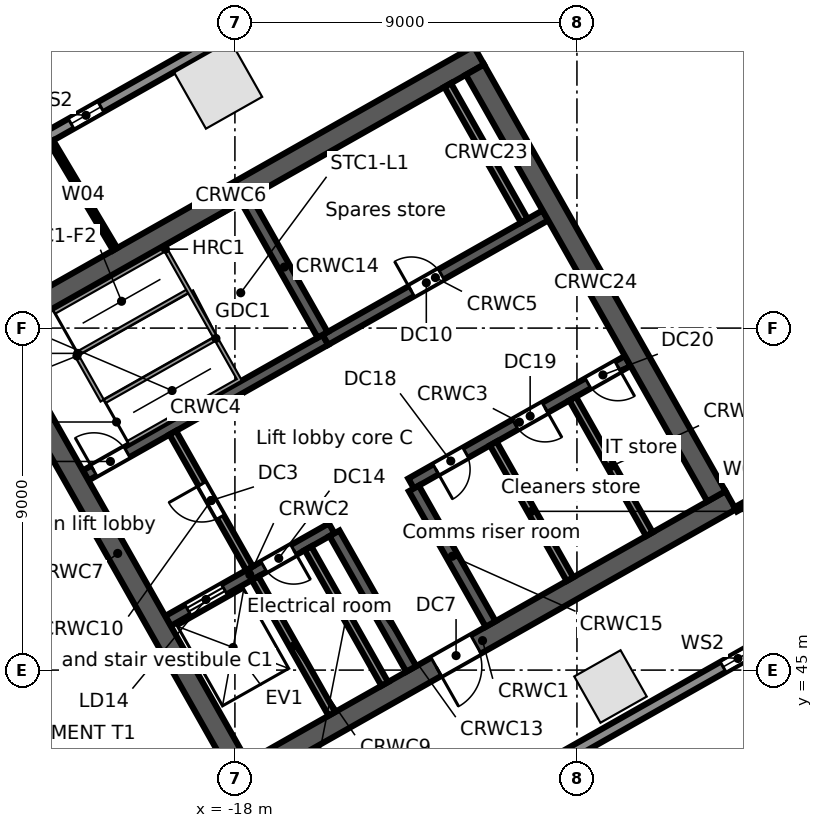
"""IFC4 building model, lengths in metres.
Left out: names, types, materials, properties, quantities, classifications, styles, units other than length and angle.
Written with IfcOpenShell. Run it as: python <this file> out.ifc"""

import sys

from ifc_helpers import new_model, si_unit, direction, frame, frame_2d, origin, origin_2d, place, context, subcontext, project, spatial, rectangle, extrude, element, fill, save


model = new_model("IFC4")
c1 = context("Model", 3, precision=1e-05, world=origin(), true_north=direction((0.0, 1.0)))
c2 = subcontext(c1, "Body", "Model", "MODEL_VIEW")
j1 = project(units=[si_unit("LENGTHUNIT", "METRE"), si_unit("PLANEANGLEUNIT", "RADIAN")], contexts=[c1])
p1 = place(None, origin())
s1 = spatial("IfcSite", under=j1, at=p1, CompositionType="ELEMENT")
p2 = place(p1, origin())
s2 = spatial("IfcBuilding", under=s1, at=p2, CompositionType="ELEMENT")
p3 = place(p2, frame((0.0, 0.0, 136.7)))
s3 = spatial("IfcBuildingStorey", under=s2, at=p3, CompositionType="ELEMENT", Elevation=136.7)
p4 = place(p3, frame((-18.441, 60.406, 0.0), z_axis=(0.0, 0.0, 1.0), x_axis=(-0.87035569594, -0.492423560103, 0.0)))
e1 = element("IfcColumn", 1, at=p4, inside=s3, PredefinedType="COLUMN", context=c2, shape_type="SweptSolid", body=[
    extrude(rectangle(XDim=1.7, YDim=1.7, at=origin_2d()), origin(), (0.0, 0.0, 1.0), 4.4),
])
p5 = place(p3, frame((-8.117, 44.568, 0.0), z_axis=(0.0, 0.0, 1.0), x_axis=(0.87035569594, 0.492423560103, 0.0)))
e2 = element("IfcColumn", 2, at=p5, inside=s3, PredefinedType="COLUMN", context=c2, shape_type="SweptSolid", body=[
    extrude(rectangle(XDim=1.4, YDim=1.4, at=origin_2d()), origin(), (0.0, 0.0, 1.0), 4.4),
])
p6 = place(p3, frame((-58.745, 38.764, 0.0), z_axis=(0.0, 0.0, 1.0), x_axis=(0.870355811726, 0.492423355453, 0.0)))
e3 = element("IfcWall", 3, at=p6, inside=s3, PredefinedType="STANDARD", context=c2, shape_type="SweptSolid", body=[
    extrude(rectangle(XDim=64.025, YDim=0.3, at=frame_2d((32.013, 0.0))), origin(), (0.0, 0.0, 1.0), 4.08),
])
p7 = place(p6, frame((60.122, 0.0, 0.6)))
e4 = element("IfcOpeningElement", 4, at=p7, cuts=e3, PredefinedType="OPENING", context=c2, shape_type="SweptSolid", body=[
    extrude(rectangle(XDim=0.9, YDim=2.8, at=frame_2d((0.45, 1.4))), frame((0.0, 0.16, 0.0), z_axis=(0.0, -1.0, 0.0), x_axis=(1.0, 0.0, 0.0)), (0.0, 0.0, 1.0), 0.32),
])
p8 = place(p6, frame((50.992, 0.0, 0.6)))
e5 = element("IfcOpeningElement", 5, at=p8, cuts=e3, PredefinedType="OPENING", context=c2, shape_type="SweptSolid", body=[
    extrude(rectangle(XDim=0.9, YDim=2.8, at=frame_2d((0.45, 1.4))), frame((0.0, 0.16, 0.0), z_axis=(0.0, -1.0, 0.0), x_axis=(1.0, 0.0, 0.0)), (0.0, 0.0, 1.0), 0.32),
])
p9 = place(p6, frame((41.862, 0.0, 0.6)))
e6 = element("IfcOpeningElement", 6, at=p9, cuts=e3, PredefinedType="OPENING", context=c2, shape_type="SweptSolid", body=[
    extrude(rectangle(XDim=0.9, YDim=2.8, at=frame_2d((0.45, 1.4))), frame((0.0, 0.16, 0.0), z_axis=(0.0, -1.0, 0.0), x_axis=(1.0, 0.0, 0.0)), (0.0, 0.0, 1.0), 0.32),
])
p10 = place(p6, frame((32.732, 0.0, 0.6)))
e7 = element("IfcOpeningElement", 7, at=p10, cuts=e3, PredefinedType="OPENING", context=c2, shape_type="SweptSolid", body=[
    extrude(rectangle(XDim=0.9, YDim=2.8, at=frame_2d((0.45, 1.4))), frame((0.0, 0.16, 0.0), z_axis=(0.0, -1.0, 0.0), x_axis=(1.0, 0.0, 0.0)), (0.0, 0.0, 1.0), 0.32),
])
p11 = place(p6, frame((23.602, 0.0, 0.6)))
e8 = element("IfcOpeningElement", 8, at=p11, cuts=e3, PredefinedType="OPENING", context=c2, shape_type="SweptSolid", body=[
    extrude(rectangle(XDim=0.9, YDim=2.8, at=frame_2d((0.45, 1.4))), frame((0.0, 0.16, 0.0), z_axis=(0.0, -1.0, 0.0), x_axis=(1.0, 0.0, 0.0)), (0.0, 0.0, 1.0), 0.32),
])
p12 = place(p6, frame((14.472, 0.0, 0.6)))
e9 = element("IfcOpeningElement", 9, at=p12, cuts=e3, PredefinedType="OPENING", context=c2, shape_type="SweptSolid", body=[
    extrude(rectangle(XDim=0.9, YDim=2.8, at=frame_2d((0.45, 1.4))), frame((0.0, 0.16, 0.0), z_axis=(0.0, -1.0, 0.0), x_axis=(1.0, 0.0, 0.0)), (0.0, 0.0, 1.0), 0.32),
])
p13 = place(p6, frame((5.342, 0.0, 0.6)))
e10 = element("IfcOpeningElement", 10, at=p13, cuts=e3, PredefinedType="OPENING", context=c2, shape_type="SweptSolid", body=[
    extrude(rectangle(XDim=0.9, YDim=2.8, at=frame_2d((0.45, 1.4))), frame((0.0, 0.16, 0.0), z_axis=(0.0, -1.0, 0.0), x_axis=(1.0, 0.0, 0.0)), (0.0, 0.0, 1.0), 0.32),
])
p14 = place(p3, frame((-0.055, 47.969, 0.0), z_axis=(0.0, 0.0, 1.0), x_axis=(-0.870355730478, -0.492423499058, 0.0)))
e11 = element("IfcWall", 11, at=p14, inside=s3, PredefinedType="STANDARD", context=c2, shape_type="SweptSolid", body=[
    extrude(rectangle(XDim=43.75, YDim=0.3, at=frame_2d((21.875, 0.0))), origin(), (0.0, 0.0, 1.0), 4.08),
])
p15 = place(p14, frame((39.977, 0.0, 0.6)))
e12 = element("IfcOpeningElement", 12, at=p15, cuts=e11, PredefinedType="OPENING", context=c2, shape_type="SweptSolid", body=[
    extrude(rectangle(XDim=0.9, YDim=2.8, at=frame_2d((0.45, 1.4))), frame((0.0, 0.16, 0.0), z_axis=(0.0, -1.0, 0.0), x_axis=(1.0, 0.0, 0.0)), (0.0, 0.0, 1.0), 0.32),
])
p16 = place(p14, frame((31.222, 0.0, 0.6)))
e13 = element("IfcOpeningElement", 13, at=p16, cuts=e11, PredefinedType="OPENING", context=c2, shape_type="SweptSolid", body=[
    extrude(rectangle(XDim=0.9, YDim=2.8, at=frame_2d((0.45, 1.4))), frame((0.0, 0.16, 0.0), z_axis=(0.0, -1.0, 0.0), x_axis=(1.0, 0.0, 0.0)), (0.0, 0.0, 1.0), 0.32),
])
p17 = place(p14, frame((22.468, 0.0, 0.6)))
e14 = element("IfcOpeningElement", 14, at=p17, cuts=e11, PredefinedType="OPENING", context=c2, shape_type="SweptSolid", body=[
    extrude(rectangle(XDim=0.9, YDim=2.8, at=frame_2d((0.45, 1.4))), frame((0.0, 0.16, 0.0), z_axis=(0.0, -1.0, 0.0), x_axis=(1.0, 0.0, 0.0)), (0.0, 0.0, 1.0), 0.32),
])
p18 = place(p14, frame((13.713, 0.0, 0.6)))
e15 = element("IfcOpeningElement", 15, at=p18, cuts=e11, PredefinedType="OPENING", context=c2, shape_type="SweptSolid", body=[
    extrude(rectangle(XDim=0.9, YDim=2.8, at=frame_2d((0.45, 1.4))), frame((0.0, 0.16, 0.0), z_axis=(0.0, -1.0, 0.0), x_axis=(1.0, 0.0, 0.0)), (0.0, 0.0, 1.0), 0.32),
])
p19 = place(p14, frame((4.959, 0.0, 0.6)))
e16 = element("IfcOpeningElement", 16, at=p19, cuts=e11, PredefinedType="OPENING", context=c2, shape_type="SweptSolid", body=[
    extrude(rectangle(XDim=0.9, YDim=2.8, at=frame_2d((0.45, 1.4))), frame((0.0, 0.16, 0.0), z_axis=(0.0, -1.0, 0.0), x_axis=(1.0, 0.0, 0.0)), (0.0, 0.0, 1.0), 0.32),
])
p20 = place(p3, frame((-18.012, 42.083, 0.0), z_axis=(0.0, 0.0, 1.0), x_axis=(0.870360574057, 0.492414937962, 0.0)))
e17 = element("IfcWall", 17, at=p20, inside=s3, PredefinedType="SOLIDWALL", context=c2, shape_type="SweptSolid", body=[
    extrude(rectangle(XDim=15.0, YDim=0.55, at=frame_2d((7.5, 0.0))), origin(), (0.0, 0.0, 1.0), 4.08),
])
p21 = place(p20, frame((6.1, 0.0, 0.0)))
e18 = element("IfcOpeningElement", 18, at=p21, cuts=e17, PredefinedType="OPENING", context=c2, shape_type="SweptSolid", body=[
    extrude(rectangle(XDim=1.2, YDim=2.1, at=frame_2d((0.6, 1.05))), frame((0.0, 0.285, 0.0), z_axis=(0.0, -1.0, 0.0), x_axis=(1.0, 0.0, 0.0)), (0.0, 0.0, 1.0), 0.57),
])
p22 = place(p3, frame((-19.762, 46.292, 0.0), z_axis=(0.0, 0.0, 1.0), x_axis=(0.870359758983, 0.49241637863, 0.0)))
e19 = element("IfcWall", 19, at=p22, inside=s3, PredefinedType="SOLIDWALL", context=c2, shape_type="SweptSolid", body=[
    extrude(rectangle(XDim=4.95, YDim=0.3, at=frame_2d((2.475, 0.0))), origin(), (0.0, 0.0, 1.0), 4.08),
])
p23 = place(p22, frame((0.6, 0.0, 0.0)))
e20 = element("IfcOpeningElement", 20, at=p23, cuts=e19, PredefinedType="OPENING", context=c2, shape_type="SweptSolid", body=[
    extrude(rectangle(XDim=1.1, YDim=2.1, at=frame_2d((0.55, 1.05))), frame((0.0, 0.16, 0.0), z_axis=(0.0, -1.0, 0.0), x_axis=(1.0, 0.0, 0.0)), (0.0, 0.0, 1.0), 0.32),
])
p24 = place(p22, frame((2.9, 0.0, 0.0)))
e21 = element("IfcOpeningElement", 21, at=p24, cuts=e19, PredefinedType="OPENING", context=c2, shape_type="SweptSolid", body=[
    extrude(rectangle(XDim=0.9, YDim=2.1, at=frame_2d((0.45, 1.05))), frame((0.0, 0.16, 0.0), z_axis=(0.0, -1.0, 0.0), x_axis=(1.0, 0.0, 0.0)), (0.0, 0.0, 1.0), 0.32),
])
p25 = place(p3, frame((-13.365, 49.911, 0.0), z_axis=(0.0, 0.0, 1.0), x_axis=(0.870336435567, 0.492457601144, 0.0)))
e22 = element("IfcWall", 22, at=p25, inside=s3, PredefinedType="SOLIDWALL", context=c2, shape_type="SweptSolid", body=[
    extrude(rectangle(XDim=6.55, YDim=0.3, at=frame_2d((3.275, 0.0))), origin(), (0.0, 0.0, 1.0), 4.08),
])
p26 = place(p25, frame((0.75, 0.0, 0.0)))
e23 = element("IfcOpeningElement", 23, at=p26, cuts=e22, PredefinedType="OPENING", context=c2, shape_type="SweptSolid", body=[
    extrude(rectangle(XDim=0.9, YDim=2.1, at=frame_2d((0.45, 1.05))), frame((0.0, 0.16, 0.0), z_axis=(0.0, -1.0, 0.0), x_axis=(1.0, 0.0, 0.0)), (0.0, 0.0, 1.0), 0.32),
])
p27 = place(p25, frame((3.15, 0.0, 0.0)))
e24 = element("IfcOpeningElement", 24, at=p27, cuts=e22, PredefinedType="OPENING", context=c2, shape_type="SweptSolid", body=[
    extrude(rectangle(XDim=0.9, YDim=2.1, at=frame_2d((0.45, 1.05))), frame((0.0, 0.16, 0.0), z_axis=(0.0, -1.0, 0.0), x_axis=(1.0, 0.0, 0.0)), (0.0, 0.0, 1.0), 0.32),
])
p28 = place(p25, frame((5.35, 0.0, 0.0)))
e25 = element("IfcOpeningElement", 25, at=p28, cuts=e22, PredefinedType="OPENING", context=c2, shape_type="SweptSolid", body=[
    extrude(rectangle(XDim=0.9, YDim=2.1, at=frame_2d((0.45, 1.05))), frame((0.0, 0.16, 0.0), z_axis=(0.0, -1.0, 0.0), x_axis=(1.0, 0.0, 0.0)), (0.0, 0.0, 1.0), 0.32),
])
p29 = place(p3, frame((-21.928, 50.121, 0.0), z_axis=(0.0, 0.0, 1.0), x_axis=(0.870340732628, 0.49245000673, 0.0)))
e26 = element("IfcWall", 26, at=p29, inside=s3, PredefinedType="SOLIDWALL", context=c2, shape_type="SweptSolid", body=[
    extrude(rectangle(XDim=7.25, YDim=0.3, at=frame_2d((3.625, 0.0))), origin(), (0.0, 0.0, 1.0), 4.08),
])
p30 = place(p29, frame((0.25, 0.0, 0.0)))
e27 = element("IfcOpeningElement", 27, at=p30, cuts=e26, PredefinedType="OPENING", context=c2, shape_type="SweptSolid", body=[
    extrude(rectangle(XDim=1.0, YDim=2.1, at=frame_2d((0.5, 1.05))), frame((0.0, 0.16, 0.0), z_axis=(0.0, -1.0, 0.0), x_axis=(1.0, 0.0, 0.0)), (0.0, 0.0, 1.0), 0.32),
])
p31 = place(p3, frame((-15.618, 53.691, 0.0), z_axis=(0.0, 0.0, 1.0), x_axis=(0.870367894134, 0.492401999246, 0.0)))
e28 = element("IfcWall", 28, at=p31, inside=s3, PredefinedType="SOLIDWALL", context=c2, shape_type="SweptSolid", body=[
    extrude(rectangle(XDim=6.65, YDim=0.3, at=frame_2d((3.325, 0.0))), origin(), (0.0, 0.0, 1.0), 4.08),
])
p32 = place(p31, frame((2.6, 0.0, 0.0)))
e29 = element("IfcOpeningElement", 29, at=p32, cuts=e28, PredefinedType="OPENING", context=c2, shape_type="SweptSolid", body=[
    extrude(rectangle(XDim=0.9, YDim=2.1, at=frame_2d((0.45, 1.05))), frame((0.0, 0.16, 0.0), z_axis=(0.0, -1.0, 0.0), x_axis=(1.0, 0.0, 0.0)), (0.0, 0.0, 1.0), 0.32),
])
p33 = place(p3, frame((-24.635, 53.789, 0.0), z_axis=(0.0, 0.0, 1.0), x_axis=(0.870360574057, 0.492414937962, 0.0)))
e30 = element("IfcWall", 30, at=p33, inside=s3, PredefinedType="SOLIDWALL", context=c2, shape_type="SweptSolid", body=[
    extrude(rectangle(XDim=15.0, YDim=0.55, at=frame_2d((7.5, 0.0))), origin(), (0.0, 0.0, 1.0), 4.08),
])
p34 = place(p3, frame((-24.26, 53.685, 0.0), z_axis=(0.0, 0.0, 1.0), x_axis=(0.492427022044, -0.870353737259, 0.0)))
e31 = element("IfcWall", 31, at=p34, inside=s3, PredefinedType="SOLIDWALL", context=c2, shape_type="SweptSolid", body=[
    extrude(rectangle(XDim=12.9, YDim=0.55, at=frame_2d((6.45, 0.0))), origin(), (0.0, 0.0, 1.0), 4.08),
])
p35 = place(p3, frame((-17.469, 47.417, 0.0), z_axis=(0.0, 0.0, 1.0), x_axis=(0.492453559952, -0.87033872216, 0.0)))
e32 = element("IfcWall", 32, at=p35, inside=s3, PredefinedType="SOLIDWALL", context=c2, shape_type="SweptSolid", body=[
    extrude(rectangle(XDim=4.1, YDim=0.2, at=frame_2d((2.05, 0.0))), origin(), (0.0, 0.0, 1.0), 4.08),
])
p36 = place(p3, frame((-19.635, 51.246, 0.0), z_axis=(0.0, 0.0, 1.0), x_axis=(0.492408451753, -0.87036424366, 0.0)))
e33 = element("IfcWall", 33, at=p36, inside=s3, PredefinedType="PARTITIONING", context=c2, shape_type="SweptSolid", body=[
    extrude(rectangle(XDim=4.1, YDim=0.2, at=frame_2d((2.05, 0.0))), origin(), (0.0, 0.0, 1.0), 4.08),
])
p37 = place(p36, frame((1.55, 0.0, 0.0)))
e34 = element("IfcOpeningElement", 34, at=p37, cuts=e33, PredefinedType="OPENING", context=c2, shape_type="SweptSolid", body=[
    extrude(rectangle(XDim=1.0, YDim=2.1, at=frame_2d((0.5, 1.05))), frame((0.0, 0.11, 0.0), z_axis=(0.0, -1.0, 0.0), x_axis=(1.0, 0.0, 0.0)), (0.0, 0.0, 1.0), 0.22),
])
p38 = place(p3, frame((-16.076, 48.205, 0.0), z_axis=(0.0, 0.0, 1.0), x_axis=(0.492408451753, -0.87036424366, 0.0)))
e35 = element("IfcWall", 35, at=p38, inside=s3, PredefinedType="SOLIDWALL", context=c2, shape_type="SweptSolid", body=[
    extrude(rectangle(XDim=4.1, YDim=0.2, at=frame_2d((2.05, 0.0))), origin(), (0.0, 0.0, 1.0), 4.08),
])
for number, where, z_axis, x_axis in (
    (36, (-15.379, 48.599, 0.0), (0.0, 0.0, 1.0), (0.492, -0.87, 0.0)),
    (37, (-17.711, 57.39, 0.0), (0.0, 0.0, 1.0), (0.492, -0.87, 0.0)),
):
    element("IfcWall", number, at=place(p3, frame(where, z_axis=z_axis, x_axis=x_axis)), inside=s3, PredefinedType="SOLIDWALL", context=c2, shape_type="SweptSolid", body=[
        extrude(rectangle(XDim=4.1, YDim=0.3, at=frame_2d((2.05, 0.0))), origin(), (0.0, 0.0, 1.0), 4.08),
    ])
p39 = place(p3, frame((-13.291, 49.781, 0.0), z_axis=(0.0, 0.0, 1.0), x_axis=(0.492382931784, -0.870378681085, 0.0)))
e38 = element("IfcWall", 38, at=p39, inside=s3, PredefinedType="SOLIDWALL", context=c2, shape_type="SweptSolid", body=[
    extrude(rectangle(XDim=4.1, YDim=0.3, at=frame_2d((2.05, 0.0))), origin(), (0.0, 0.0, 1.0), 4.08),
])
p40 = place(p3, frame((-11.202, 50.962, 0.0), z_axis=(0.0, 0.0, 1.0), x_axis=(0.492428039142, -0.870353161807, 0.0)))
e39 = element("IfcWall", 39, at=p40, inside=s3, PredefinedType="PARTITIONING", context=c2, shape_type="SweptSolid", body=[
    extrude(rectangle(XDim=4.1, YDim=0.2, at=frame_2d((2.05, 0.0))), origin(), (0.0, 0.0, 1.0), 4.08),
])
p41 = place(p3, frame((-9.113, 52.144, 0.0), z_axis=(0.0, 0.0, 1.0), x_axis=(0.492408451753, -0.87036424366, 0.0)))
e40 = element("IfcWall", 40, at=p41, inside=s3, PredefinedType="PARTITIONING", context=c2, shape_type="SweptSolid", body=[
    extrude(rectangle(XDim=4.1, YDim=0.2, at=frame_2d((2.05, 0.0))), origin(), (0.0, 0.0, 1.0), 4.08),
])
p42 = place(p3, frame((-12.402, 60.394, 0.0), z_axis=(0.0, 0.0, 1.0), x_axis=(0.492453559952, -0.87033872216, 0.0)))
e41 = element("IfcWall", 41, at=p42, inside=s3, PredefinedType="SOLIDWALL", context=c2, shape_type="SweptSolid", body=[
    extrude(rectangle(XDim=4.1, YDim=0.2, at=frame_2d((2.05, 0.0))), origin(), (0.0, 0.0, 1.0), 4.08),
])
p43 = place(p3, frame((-11.684, 60.8, 0.0), z_axis=(0.0, 0.0, 1.0), x_axis=(0.492427022044, -0.870353737259, 0.0)))
e42 = element("IfcWall", 42, at=p43, inside=s3, PredefinedType="SOLIDWALL", context=c2, shape_type="SweptSolid", body=[
    extrude(rectangle(XDim=12.9, YDim=0.55, at=frame_2d((6.45, 0.0))), origin(), (0.0, 0.0, 1.0), 4.08),
])
p44 = place(p3, frame((-22.835, 58.908, 0.0), z_axis=(0.0, 0.0, 1.0), x_axis=(0.511113859879, -0.859513014584, 0.0)))
e43 = element("IfcWall", 43, at=p44, inside=s3, PredefinedType="PARTITIONING", context=c2, shape_type="SweptSolid", body=[
    extrude(rectangle(XDim=3.295, YDim=0.125, at=frame_2d((1.647, 0.0))), origin(), (0.0, 0.0, 1.0), 3.36),
])
p45 = place(p3, frame((-4.821, 49.23, 0.0), z_axis=(0.0, 0.0, 1.0), x_axis=(0.870371217631, 0.492396124598, 0.0)))
e44 = element("IfcWall", 44, at=p45, inside=s3, PredefinedType="PARTITIONING", context=c2, shape_type="SweptSolid", body=[
    extrude(rectangle(XDim=2.659, YDim=0.125, at=frame_2d((1.329, 0.0))), origin(), (0.0, 0.0, 1.0), 4.08),
])
p46 = place(p9, origin())
e45 = element("IfcWindow", 45, at=p46, inside=s3, PartitioningType="SINGLE_PANEL", PredefinedType="WINDOW", context=c2, shape_type="SweptSolid", body=[
    extrude(rectangle(XDim=0.9, YDim=2.8, at=frame_2d((0.45, 1.4))), frame((0.0, 0.03, 0.0), z_axis=(0.0, -1.0, 0.0), x_axis=(1.0, 0.0, 0.0)), (0.0, 0.0, 1.0), 0.06),
])
fill(e6, e45)
p47 = place(p19, origin())
e46 = element("IfcWindow", 46, at=p47, inside=s3, PartitioningType="SINGLE_PANEL", PredefinedType="WINDOW", context=c2, shape_type="SweptSolid", body=[
    extrude(rectangle(XDim=0.9, YDim=2.8, at=frame_2d((0.45, 1.4))), frame((0.0, 0.03, 0.0), z_axis=(0.0, -1.0, 0.0), x_axis=(1.0, 0.0, 0.0)), (0.0, 0.0, 1.0), 0.06),
])
fill(e16, e46)
p48 = place(p23, origin())
e47 = element("IfcDoor", 47, at=p48, inside=s3, OperationType="DOUBLE_DOOR_SLIDING", PredefinedType="DOOR", context=c2, shape_type="SweptSolid", body=[
    extrude(rectangle(XDim=1.1, YDim=2.1, at=frame_2d((0.55, 1.05))), frame((0.0, 0.025, 0.0), z_axis=(0.0, -1.0, 0.0), x_axis=(1.0, 0.0, 0.0)), (0.0, 0.0, 1.0), 0.05),
])
fill(e20, e47)
p49 = place(p30, origin())
e48 = element("IfcDoor", 48, at=p49, inside=s3, OperationType="SINGLE_SWING_LEFT", PredefinedType="DOOR", context=c2, shape_type="SweptSolid", body=[
    extrude(rectangle(XDim=1.0, YDim=2.1, at=frame_2d((0.5, 1.05))), frame((0.0, 0.025, 0.0), z_axis=(0.0, -1.0, 0.0), x_axis=(1.0, 0.0, 0.0)), (0.0, 0.0, 1.0), 0.05),
])
fill(e27, e48)
p50 = place(p37, frame((1.0, 0.0, 0.0), z_axis=(0.0, 0.0, 1.0), x_axis=(-1.0, 0.0, 0.0)))
e49 = element("IfcDoor", 49, at=p50, inside=s3, OperationType="SINGLE_SWING_RIGHT", PredefinedType="DOOR", context=c2, shape_type="SweptSolid", body=[
    extrude(rectangle(XDim=1.0, YDim=2.1, at=frame_2d((0.5, 1.05))), frame((0.0, 0.025, 0.0), z_axis=(0.0, -1.0, 0.0), x_axis=(1.0, 0.0, 0.0)), (0.0, 0.0, 1.0), 0.05),
])
fill(e34, e49)
p51 = place(p21, frame((1.2, 0.0, 0.0), z_axis=(0.0, 0.0, 1.0), x_axis=(-1.0, 0.0, 0.0)))
e50 = element("IfcDoor", 50, at=p51, inside=s3, OperationType="SINGLE_SWING_RIGHT", PredefinedType="DOOR", context=c2, shape_type="SweptSolid", body=[
    extrude(rectangle(XDim=1.2, YDim=2.1, at=frame_2d((0.6, 1.05))), frame((0.0, 0.025, 0.0), z_axis=(0.0, -1.0, 0.0), x_axis=(1.0, 0.0, 0.0)), (0.0, 0.0, 1.0), 0.05),
])
fill(e18, e50)
p52 = place(p32, origin())
e51 = element("IfcDoor", 51, at=p52, inside=s3, OperationType="SINGLE_SWING_LEFT", PredefinedType="DOOR", context=c2, shape_type="SweptSolid", body=[
    extrude(rectangle(XDim=0.9, YDim=2.1, at=frame_2d((0.45, 1.05))), frame((0.0, 0.025, 0.0), z_axis=(0.0, -1.0, 0.0), x_axis=(1.0, 0.0, 0.0)), (0.0, 0.0, 1.0), 0.05),
])
fill(e29, e51)
p53 = place(p24, frame((0.9, 0.0, 0.0), z_axis=(0.0, 0.0, 1.0), x_axis=(-1.0, 0.0, 0.0)))
e52 = element("IfcDoor", 52, at=p53, inside=s3, OperationType="SINGLE_SWING_LEFT", PredefinedType="DOOR", context=c2, shape_type="SweptSolid", body=[
    extrude(rectangle(XDim=0.9, YDim=2.1, at=frame_2d((0.45, 1.05))), frame((0.0, 0.025, 0.0), z_axis=(0.0, -1.0, 0.0), x_axis=(1.0, 0.0, 0.0)), (0.0, 0.0, 1.0), 0.05),
])
fill(e21, e52)
p54 = place(p26, frame((0.9, 0.0, 0.0), z_axis=(0.0, 0.0, 1.0), x_axis=(-1.0, 0.0, 0.0)))
e53 = element("IfcDoor", 53, at=p54, inside=s3, OperationType="SINGLE_SWING_RIGHT", PredefinedType="DOOR", context=c2, shape_type="SweptSolid", body=[
    extrude(rectangle(XDim=0.9, YDim=2.1, at=frame_2d((0.45, 1.05))), frame((0.0, 0.025, 0.0), z_axis=(0.0, -1.0, 0.0), x_axis=(1.0, 0.0, 0.0)), (0.0, 0.0, 1.0), 0.05),
])
fill(e23, e53)
p55 = place(p27, frame((0.9, 0.0, 0.0), z_axis=(0.0, 0.0, 1.0), x_axis=(-1.0, 0.0, 0.0)))
e54 = element("IfcDoor", 54, at=p55, inside=s3, OperationType="SINGLE_SWING_LEFT", PredefinedType="DOOR", context=c2, shape_type="SweptSolid", body=[
    extrude(rectangle(XDim=0.9, YDim=2.1, at=frame_2d((0.45, 1.05))), frame((0.0, 0.025, 0.0), z_axis=(0.0, -1.0, 0.0), x_axis=(1.0, 0.0, 0.0)), (0.0, 0.0, 1.0), 0.05),
])
fill(e24, e54)
p56 = place(p28, frame((0.9, 0.0, 0.0), z_axis=(0.0, 0.0, 1.0), x_axis=(-1.0, 0.0, 0.0)))
e55 = element("IfcDoor", 55, at=p56, inside=s3, OperationType="SINGLE_SWING_LEFT", PredefinedType="DOOR", context=c2, shape_type="SweptSolid", body=[
    extrude(rectangle(XDim=0.9, YDim=2.1, at=frame_2d((0.45, 1.05))), frame((0.0, 0.025, 0.0), z_axis=(0.0, -1.0, 0.0), x_axis=(1.0, 0.0, 0.0)), (0.0, 0.0, 1.0), 0.05),
])
fill(e25, e55)
save(model, sys.argv[1])
